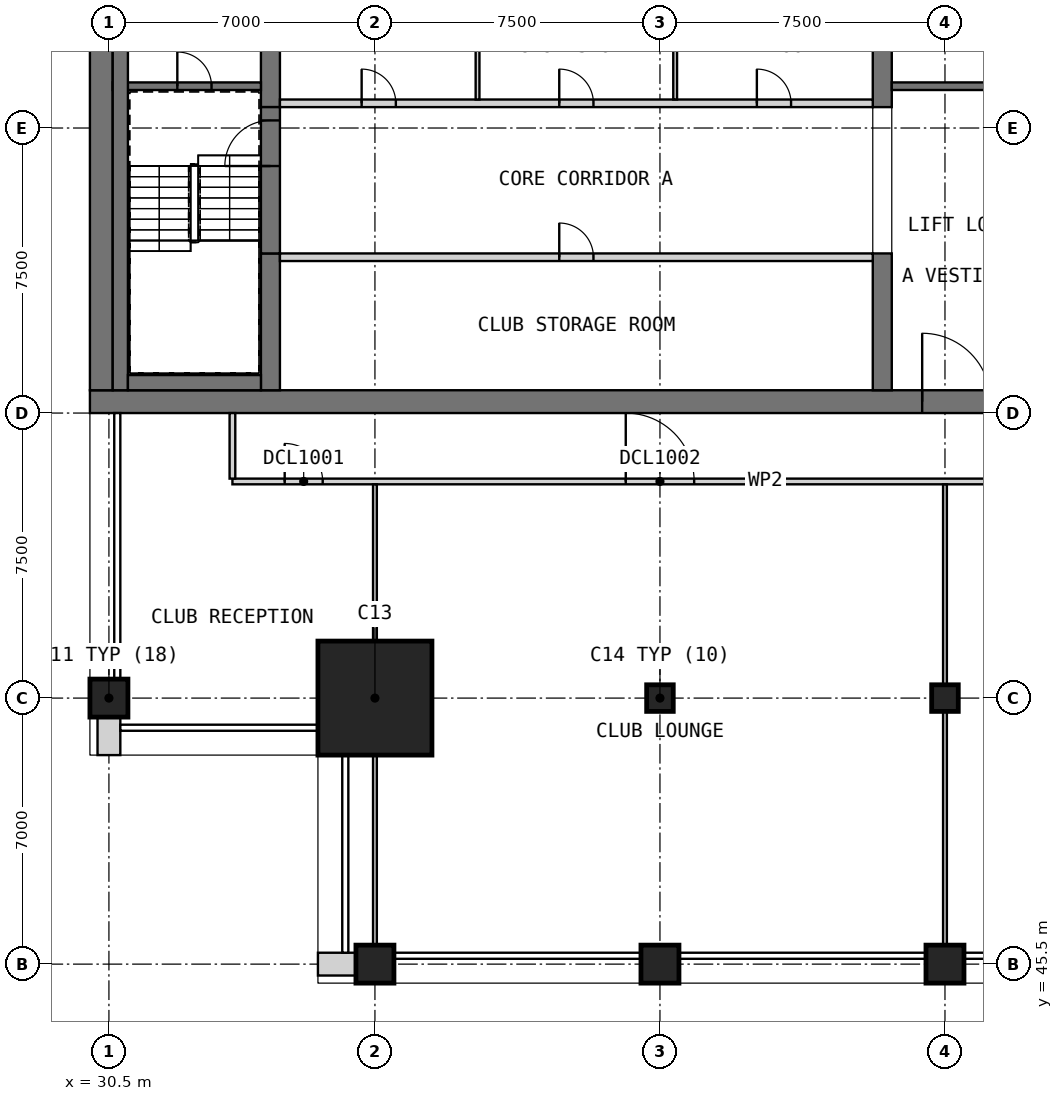
"""IFC4 building model, lengths in metres.
Left out: names, types, materials, properties, quantities, classifications, styles, units other than length and angle.
Written with IfcOpenShell. Run it as: python <this file> out.ifc"""

import sys

from ifc_helpers import new_model, si_unit, direction, frame, frame_2d, origin, origin_2d, place, context, subcontext, project, spatial, rectangle, extrude, element, fill, save


model = new_model("IFC4")
c1 = context("Model", 3, precision=1e-05, world=origin(), true_north=direction((0.0, 1.0)))
c2 = subcontext(c1, "Body", "Model", "MODEL_VIEW")
j1 = project(units=[si_unit("LENGTHUNIT", "METRE"), si_unit("PLANEANGLEUNIT", "RADIAN")], contexts=[c1])
p1 = place(None, origin())
s1 = spatial("IfcSite", under=j1, at=p1, CompositionType="ELEMENT")
p2 = place(p1, origin())
s2 = spatial("IfcBuilding", under=s1, at=p2, CompositionType="ELEMENT")
p3 = place(p2, frame((0.0, 0.0, 287.2)))
s3 = spatial("IfcBuildingStorey", under=s2, at=p3, CompositionType="ELEMENT", Elevation=287.2)
for number, where, z_axis, x_axis in (
    (1, (30.5, 52.5, 0.0), (0.0, 0.0, 1.0), (1.0, 0.0, 0.0)),
    (2, (37.5, 45.5, 0.0), (0.0, 0.0, 1.0), (1.0, 0.0, 0.0)),
    (3, (45.0, 45.5, 0.0), (0.0, 0.0, 1.0), (1.0, 0.0, 0.0)),
):
    element("IfcColumn", number, at=place(p3, frame(where, z_axis=z_axis, x_axis=x_axis)), inside=s3, PredefinedType="COLUMN", context=c2, shape_type="SweptSolid", body=[
        extrude(rectangle(XDim=1.0, YDim=1.0, at=origin_2d()), origin(), (0.0, 0.0, 1.0), 5.0),
    ])
p4 = place(p3, frame((45.0, 52.5, 0.0), z_axis=(0.0, 0.0, 1.0), x_axis=(1.0, 0.0, 0.0)))
e4 = element("IfcColumn", 4, at=p4, inside=s3, PredefinedType="COLUMN", context=c2, shape_type="SweptSolid", body=[
    extrude(rectangle(XDim=0.7, YDim=0.7, at=origin_2d()), origin(), (0.0, 0.0, 1.0), 5.0),
])
p5 = place(p3, frame((52.5, 45.5, 0.0), z_axis=(0.0, 0.0, 1.0), x_axis=(1.0, 0.0, 0.0)))
e5 = element("IfcColumn", 5, at=p5, inside=s3, PredefinedType="COLUMN", context=c2, shape_type="SweptSolid", body=[
    extrude(rectangle(XDim=1.0, YDim=1.0, at=origin_2d()), origin(), (0.0, 0.0, 1.0), 5.0),
])
p6 = place(p3, frame((52.5, 52.5, 0.0), z_axis=(0.0, 0.0, 1.0), x_axis=(1.0, 0.0, 0.0)))
e6 = element("IfcColumn", 6, at=p6, inside=s3, PredefinedType="COLUMN", context=c2, shape_type="SweptSolid", body=[
    extrude(rectangle(XDim=0.7, YDim=0.7, at=origin_2d()), origin(), (0.0, 0.0, 1.0), 5.0),
])
p7 = place(p3, frame((37.5, 52.5, 0.0), z_axis=(0.0, 0.0, 1.0), x_axis=(1.0, 0.0, 0.0)))
e7 = element("IfcColumn", 7, at=p7, inside=s3, PredefinedType="COLUMN", context=c2, shape_type="SweptSolid", body=[
    extrude(rectangle(XDim=3.0, YDim=3.0, at=origin_2d()), origin(), (0.0, 0.0, 1.0), 5.0),
])
p8 = place(p3, frame((30.0, 60.3, 0.0), z_axis=(0.0, 0.0, 1.0), x_axis=(1.0, 0.0, 0.0)))
e8 = element("IfcWall", 8, at=p8, inside=s3, PredefinedType="SHEAR", context=c2, shape_type="SweptSolid", body=[
    extrude(rectangle(XDim=30.0, YDim=0.6, at=frame_2d((15.0, 0.0))), origin(), (0.0, 0.0, 1.0), 5.0),
])
p9 = place(p8, frame((21.9, 0.0, 0.0)))
e9 = element("IfcOpeningElement", 9, at=p9, cuts=e8, PredefinedType="OPENING", context=c2, shape_type="SweptSolid", body=[
    extrude(rectangle(XDim=1.8, YDim=2.1, at=frame_2d((0.9, 1.05))), frame((0.0, 0.31, 0.0), z_axis=(0.0, -1.0, 0.0), x_axis=(1.0, 0.0, 0.0)), (0.0, 0.0, 1.0), 0.62),
])
p10 = place(p8, frame((26.5, 0.0, 0.0)))
e10 = element("IfcOpeningElement", 10, at=p10, cuts=e8, PredefinedType="OPENING", context=c2, shape_type="SweptSolid", body=[
    extrude(rectangle(XDim=1.2, YDim=2.1, at=frame_2d((0.6, 1.05))), frame((0.0, 0.31, 0.0), z_axis=(0.0, -1.0, 0.0), x_axis=(1.0, 0.0, 0.0)), (0.0, 0.0, 1.0), 0.62),
])
p11 = place(p3, frame((30.3, 60.6, 0.0), z_axis=(0.0, 0.0, 1.0), x_axis=(0.0, 1.0, 0.0)))
e11 = element("IfcWall", 11, at=p11, inside=s3, PredefinedType="SHEAR", context=c2, shape_type="SweptSolid", body=[
    extrude(rectangle(XDim=21.3, YDim=0.6, at=frame_2d((10.65, 0.0))), origin(), (0.0, 0.0, 1.0), 5.0),
])
p12 = place(p3, frame((34.75, 60.6, 0.0), z_axis=(0.0, 0.0, 1.0), x_axis=(0.0, 1.0, 0.0)))
e12 = element("IfcWall", 12, at=p12, inside=s3, PredefinedType="SHEAR", context=c2, shape_type="SweptSolid", body=[
    extrude(rectangle(XDim=3.6, YDim=0.5, at=frame_2d((1.8, 0.0))), origin(), (0.0, 0.0, 1.0), 5.0),
])
p13 = place(p3, frame((34.75, 68.05, 0.0), z_axis=(0.0, 0.0, 1.0), x_axis=(0.0, 1.0, 0.0)))
e13 = element("IfcWall", 13, at=p13, inside=s3, PredefinedType="SHEAR", context=c2, shape_type="SweptSolid", body=[
    extrude(rectangle(XDim=6.4, YDim=0.5, at=frame_2d((3.2, 0.0))), origin(), (0.0, 0.0, 1.0), 5.0),
])
p14 = place(p3, frame((50.85, 60.6, 0.0), z_axis=(0.0, 0.0, 1.0), x_axis=(0.0, 1.0, 0.0)))
e14 = element("IfcWall", 14, at=p14, inside=s3, PredefinedType="SHEAR", context=c2, shape_type="SweptSolid", body=[
    extrude(rectangle(XDim=3.6, YDim=0.5, at=frame_2d((1.8, 0.0))), origin(), (0.0, 0.0, 1.0), 5.0),
])
p15 = place(p3, frame((50.85, 68.05, 0.0), z_axis=(0.0, 0.0, 1.0), x_axis=(0.0, 1.0, 0.0)))
e15 = element("IfcWall", 15, at=p15, inside=s3, PredefinedType="SHEAR", context=c2, shape_type="SweptSolid", body=[
    extrude(rectangle(XDim=6.4, YDim=0.5, at=frame_2d((3.2, 0.0))), origin(), (0.0, 0.0, 1.0), 5.0),
])
p16 = place(p2, frame((0.0, 0.0, 34.0)))
s4 = spatial("IfcBuildingStorey", under=s2, at=p16, CompositionType="ELEMENT", Elevation=34.0)
for number, where, z_axis, x_axis in (
    (16, (29.7, 61.05, 0.0), (0.0, 0.0, 1.0), (0.0, 1.0, 0.0)),
    (17, (29.7, 65.925, 0.0), (0.0, 0.0, 1.0), (0.0, 1.0, 0.0)),
):
    element("IfcWall", number, at=place(p16, frame(where, z_axis=z_axis, x_axis=x_axis)), inside=s4, PredefinedType="SOLIDWALL", context=c2, shape_type="SweptSolid", body=[
        extrude(rectangle(XDim=0.9, YDim=0.6, at=frame_2d((0.45, 0.0))), origin(), (0.0, 0.0, 1.0), 286.2),
    ])
for number, where, z_axis, x_axis in (
    (18, (36.0, 45.5, 0.0), (0.0, 0.0, 1.0), (1.0, 0.0, 0.0)),
    (19, (30.5, 52.0, 0.0), (0.0, 0.0, 1.0), (0.0, -1.0, 0.0)),
):
    element("IfcWall", number, at=place(p3, frame(where, z_axis=z_axis, x_axis=x_axis)), inside=s3, PredefinedType="SOLIDWALL", context=c2, shape_type="SweptSolid", body=[
        extrude(rectangle(XDim=1.0, YDim=0.6, at=frame_2d((0.5, 0.0))), origin(), (0.0, 0.0, 1.0), 4.7),
    ])
p17 = place(p3, frame((35.0, 64.1, 0.0), z_axis=(0.0, 0.0, 1.0), x_axis=(1.0, 0.0, 0.0)))
e20 = element("IfcWall", 20, at=p17, inside=s3, PredefinedType="PARTITIONING", context=c2, shape_type="SweptSolid", body=[
    extrude(rectangle(XDim=15.6, YDim=0.2, at=frame_2d((7.8, 0.0))), origin(), (0.0, 0.0, 1.0), 4.7),
])
p18 = place(p17, frame((7.35, 0.0, 0.0)))
e21 = element("IfcOpeningElement", 21, at=p18, cuts=e20, PredefinedType="OPENING", context=c2, shape_type="SweptSolid", body=[
    extrude(rectangle(XDim=0.9, YDim=2.1, at=frame_2d((0.45, 1.05))), frame((0.0, 0.11, 0.0), z_axis=(0.0, -1.0, 0.0), x_axis=(1.0, 0.0, 0.0)), (0.0, 0.0, 1.0), 0.22),
])
p19 = place(p3, frame((35.0, 68.15, 0.0), z_axis=(0.0, 0.0, 1.0), x_axis=(1.0, 0.0, 0.0)))
e22 = element("IfcWall", 22, at=p19, inside=s3, PredefinedType="PARTITIONING", context=c2, shape_type="SweptSolid", body=[
    extrude(rectangle(XDim=15.6, YDim=0.2, at=frame_2d((7.8, 0.0))), origin(), (0.0, 0.0, 1.0), 4.7),
])
p20 = place(p19, frame((2.15, 0.0, 0.0)))
e23 = element("IfcOpeningElement", 23, at=p20, cuts=e22, PredefinedType="OPENING", context=c2, shape_type="SweptSolid", body=[
    extrude(rectangle(XDim=0.9, YDim=2.1, at=frame_2d((0.45, 1.05))), frame((0.0, 0.11, 0.0), z_axis=(0.0, -1.0, 0.0), x_axis=(1.0, 0.0, 0.0)), (0.0, 0.0, 1.0), 0.22),
])
p21 = place(p19, frame((7.35, 0.0, 0.0)))
e24 = element("IfcOpeningElement", 24, at=p21, cuts=e22, PredefinedType="OPENING", context=c2, shape_type="SweptSolid", body=[
    extrude(rectangle(XDim=0.9, YDim=2.1, at=frame_2d((0.45, 1.05))), frame((0.0, 0.11, 0.0), z_axis=(0.0, -1.0, 0.0), x_axis=(1.0, 0.0, 0.0)), (0.0, 0.0, 1.0), 0.22),
])
p22 = place(p19, frame((12.55, 0.0, 0.0)))
e25 = element("IfcOpeningElement", 25, at=p22, cuts=e22, PredefinedType="OPENING", context=c2, shape_type="SweptSolid", body=[
    extrude(rectangle(XDim=0.9, YDim=2.1, at=frame_2d((0.45, 1.05))), frame((0.0, 0.11, 0.0), z_axis=(0.0, -1.0, 0.0), x_axis=(1.0, 0.0, 0.0)), (0.0, 0.0, 1.0), 0.22),
])
for number, where, z_axis, x_axis in (
    (26, (40.2, 68.25, 0.0), (0.0, 0.0, 1.0), (0.0, 1.0, 0.0)),
    (27, (45.4, 68.25, 0.0), (0.0, 0.0, 1.0), (0.0, 1.0, 0.0)),
):
    element("IfcWall", number, at=place(p3, frame(where, z_axis=z_axis, x_axis=x_axis)), inside=s3, PredefinedType="PARTITIONING", context=c2, shape_type="SweptSolid", body=[
        extrude(rectangle(XDim=2.75, YDim=0.1, at=frame_2d((1.375, 0.0))), origin(), (0.0, 0.0, 1.0), 4.7),
    ])
p23 = place(p3, frame((34.75, 64.2, 0.0), z_axis=(0.0, 0.0, 1.0), x_axis=(0.0, 1.0, 0.0)))
e28 = element("IfcWall", 28, at=p23, inside=s3, PredefinedType="SOLIDWALL", context=c2, shape_type="SweptSolid", body=[
    extrude(rectangle(XDim=3.85, YDim=0.5, at=frame_2d((1.925, 0.0))), origin(), (0.0, 0.0, 1.0), 3.8),
])
p24 = place(p23, frame((2.3, 0.0, 0.0)))
e29 = element("IfcOpeningElement", 29, at=p24, cuts=e28, PredefinedType="OPENING", context=c2, shape_type="SweptSolid", body=[
    extrude(rectangle(XDim=1.2, YDim=2.1, at=frame_2d((0.6, 1.05))), frame((0.0, 0.26, 0.0), z_axis=(0.0, -1.0, 0.0), x_axis=(1.0, 0.0, 0.0)), (0.0, 0.0, 1.0), 0.52),
])
p25 = place(p3, frame((30.6, 68.6, 0.0), z_axis=(0.0, 0.0, 1.0), x_axis=(1.0, 0.0, 0.0)))
e30 = element("IfcWall", 30, at=p25, inside=s3, PredefinedType="SOLIDWALL", context=c2, shape_type="SweptSolid", body=[
    extrude(rectangle(XDim=3.9, YDim=0.2, at=frame_2d((1.95, 0.0))), origin(), (0.0, 0.0, 1.0), 4.7),
])
p26 = place(p25, frame((1.7, 0.0, 0.0)))
e31 = element("IfcOpeningElement", 31, at=p26, cuts=e30, PredefinedType="OPENING", context=c2, shape_type="SweptSolid", body=[
    extrude(rectangle(XDim=0.9, YDim=2.1, at=frame_2d((0.45, 1.05))), frame((0.0, 0.11, 0.0), z_axis=(0.0, -1.0, 0.0), x_axis=(1.0, 0.0, 0.0)), (0.0, 0.0, 1.0), 0.22),
])
p27 = place(p3, frame((51.1, 68.6, 0.0), z_axis=(0.0, 0.0, 1.0), x_axis=(1.0, 0.0, 0.0)))
e32 = element("IfcWall", 32, at=p27, inside=s3, PredefinedType="SOLIDWALL", context=c2, shape_type="SweptSolid", body=[
    extrude(rectangle(XDim=8.3, YDim=0.2, at=frame_2d((4.15, 0.0))), origin(), (0.0, 0.0, 1.0), 4.7),
])
p28 = place(p3, frame((30.8, 60.6, 0.0), z_axis=(0.0, 0.0, 1.0), x_axis=(0.0, 1.0, 0.0)))
e33 = element("IfcWall", 33, at=p28, inside=s3, PredefinedType="SOLIDWALL", context=c2, shape_type="SweptSolid", body=[
    extrude(rectangle(XDim=21.3, YDim=0.4, at=frame_2d((10.65, 0.0))), origin(), (0.0, 0.0, 1.0), 4.7),
])
p29 = place(p3, frame((31.0, 60.8, 0.0), z_axis=(0.0, 0.0, 1.0), x_axis=(1.0, 0.0, 0.0)))
e34 = element("IfcWall", 34, at=p29, inside=s3, PredefinedType="SOLIDWALL", context=c2, shape_type="SweptSolid", body=[
    extrude(rectangle(XDim=3.5, YDim=0.4, at=frame_2d((1.75, 0.0))), origin(), (0.0, 0.0, 1.0), 4.7),
])
p30 = place(p3, frame((33.75, 58.2, 0.0), z_axis=(0.0, 0.0, 1.0), x_axis=(1.0, 0.0, 0.0)))
e35 = element("IfcWall", 35, at=p30, inside=s3, PredefinedType="PARTITIONING", context=c2, shape_type="SweptSolid", body=[
    extrude(rectangle(XDim=28.05, YDim=0.15, at=frame_2d((14.025, 0.0))), origin(), (0.0, 0.0, 1.0), 4.7),
])
p31 = place(p30, frame((1.375, 0.0, 0.0)))
e36 = element("IfcOpeningElement", 36, at=p31, cuts=e35, PredefinedType="OPENING", context=c2, shape_type="SweptSolid", body=[
    extrude(rectangle(XDim=1.0, YDim=2.1, at=frame_2d((0.5, 1.05))), frame((0.0, 0.085, 0.0), z_axis=(0.0, -1.0, 0.0), x_axis=(1.0, 0.0, 0.0)), (0.0, 0.0, 1.0), 0.17),
])
p32 = place(p30, frame((10.35, 0.0, 0.0)))
e37 = element("IfcOpeningElement", 37, at=p32, cuts=e35, PredefinedType="OPENING", context=c2, shape_type="SweptSolid", body=[
    extrude(rectangle(XDim=1.8, YDim=2.1, at=frame_2d((0.9, 1.05))), frame((0.0, 0.085, 0.0), z_axis=(0.0, -1.0, 0.0), x_axis=(1.0, 0.0, 0.0)), (0.0, 0.0, 1.0), 0.17),
])
p33 = place(p30, frame((22.0, 0.0, 0.0)))
e38 = element("IfcOpeningElement", 38, at=p33, cuts=e35, PredefinedType="OPENING", context=c2, shape_type="SweptSolid", body=[
    extrude(rectangle(XDim=1.0, YDim=2.1, at=frame_2d((0.5, 1.05))), frame((0.0, 0.085, 0.0), z_axis=(0.0, -1.0, 0.0), x_axis=(1.0, 0.0, 0.0)), (0.0, 0.0, 1.0), 0.17),
])
p34 = place(p30, frame((26.65, 0.0, 0.0)))
e39 = element("IfcOpeningElement", 39, at=p34, cuts=e35, PredefinedType="OPENING", context=c2, shape_type="SweptSolid", body=[
    extrude(rectangle(XDim=1.0, YDim=2.1, at=frame_2d((0.5, 1.05))), frame((0.0, 0.085, 0.0), z_axis=(0.0, -1.0, 0.0), x_axis=(1.0, 0.0, 0.0)), (0.0, 0.0, 1.0), 0.17),
])
p35 = place(p3, frame((33.75, 58.275, 0.0), z_axis=(0.0, 0.0, 1.0), x_axis=(0.0, 1.0, 0.0)))
e40 = element("IfcWall", 40, at=p35, inside=s3, PredefinedType="PARTITIONING", context=c2, shape_type="SweptSolid", body=[
    extrude(rectangle(XDim=1.725, YDim=0.15, at=frame_2d((0.863, 0.0))), origin(), (0.0, 0.0, 1.0), 4.7),
])
p36 = place(p3, frame((37.5, 45.0, 0.0), z_axis=(0.0, 0.0, 1.0), x_axis=(0.0, 1.0, 0.0)))
e41 = element("IfcWall", 41, at=p36, inside=s3, PredefinedType="PARTITIONING", context=c2, shape_type="SweptSolid", body=[
    extrude(rectangle(XDim=13.125, YDim=0.1, at=frame_2d((6.562, 0.0))), origin(), (0.0, 0.0, 1.0), 4.25),
])
p37 = place(p3, frame((52.5, 45.0, 0.0), z_axis=(0.0, 0.0, 1.0), x_axis=(0.0, 1.0, 0.0)))
e42 = element("IfcWall", 42, at=p37, inside=s3, PredefinedType="PARTITIONING", context=c2, shape_type="SweptSolid", body=[
    extrude(rectangle(XDim=13.125, YDim=0.1, at=frame_2d((6.562, 0.0))), origin(), (0.0, 0.0, 1.0), 4.7),
])
p38 = place(p18, origin())
e43 = element("IfcDoor", 43, at=p38, inside=s3, OperationType="SINGLE_SWING_RIGHT", PredefinedType="DOOR", context=c2, shape_type="SweptSolid", body=[
    extrude(rectangle(XDim=0.9, YDim=2.1, at=frame_2d((0.45, 1.05))), frame((0.0, 0.025, 0.0), z_axis=(0.0, -1.0, 0.0), x_axis=(1.0, 0.0, 0.0)), (0.0, 0.0, 1.0), 0.05),
])
fill(e21, e43)
p39 = place(p20, origin())
e44 = element("IfcDoor", 44, at=p39, inside=s3, OperationType="SINGLE_SWING_RIGHT", PredefinedType="DOOR", context=c2, shape_type="SweptSolid", body=[
    extrude(rectangle(XDim=0.9, YDim=2.1, at=frame_2d((0.45, 1.05))), frame((0.0, 0.025, 0.0), z_axis=(0.0, -1.0, 0.0), x_axis=(1.0, 0.0, 0.0)), (0.0, 0.0, 1.0), 0.05),
])
fill(e23, e44)
p40 = place(p21, origin())
e45 = element("IfcDoor", 45, at=p40, inside=s3, OperationType="SINGLE_SWING_LEFT", PredefinedType="DOOR", context=c2, shape_type="SweptSolid", body=[
    extrude(rectangle(XDim=0.9, YDim=2.1, at=frame_2d((0.45, 1.05))), frame((0.0, 0.025, 0.0), z_axis=(0.0, -1.0, 0.0), x_axis=(1.0, 0.0, 0.0)), (0.0, 0.0, 1.0), 0.05),
])
fill(e24, e45)
p41 = place(p22, origin())
e46 = element("IfcDoor", 46, at=p41, inside=s3, OperationType="SINGLE_SWING_RIGHT", PredefinedType="DOOR", context=c2, shape_type="SweptSolid", body=[
    extrude(rectangle(XDim=0.9, YDim=2.1, at=frame_2d((0.45, 1.05))), frame((0.0, 0.025, 0.0), z_axis=(0.0, -1.0, 0.0), x_axis=(1.0, 0.0, 0.0)), (0.0, 0.0, 1.0), 0.05),
])
fill(e25, e46)
p42 = place(p9, origin())
e47 = element("IfcDoor", 47, at=p42, inside=s3, OperationType="DOUBLE_DOOR_SINGLE_SWING", PredefinedType="DOOR", context=c2, shape_type="SweptSolid", body=[
    extrude(rectangle(XDim=1.8, YDim=2.1, at=frame_2d((0.9, 1.05))), frame((0.0, 0.025, 0.0), z_axis=(0.0, -1.0, 0.0), x_axis=(1.0, 0.0, 0.0)), (0.0, 0.0, 1.0), 0.05),
])
fill(e9, e47)
p43 = place(p24, origin())
e48 = element("IfcDoor", 48, at=p43, inside=s3, OperationType="SINGLE_SWING_LEFT", PredefinedType="DOOR", context=c2, shape_type="SweptSolid", body=[
    extrude(rectangle(XDim=1.2, YDim=2.1, at=frame_2d((0.6, 1.05))), frame((0.0, 0.025, 0.0), z_axis=(0.0, -1.0, 0.0), x_axis=(1.0, 0.0, 0.0)), (0.0, 0.0, 1.0), 0.05),
])
fill(e29, e48)
p44 = place(p26, origin())
e49 = element("IfcDoor", 49, at=p44, inside=s3, OperationType="SINGLE_SWING_LEFT", PredefinedType="DOOR", context=c2, shape_type="SweptSolid", body=[
    extrude(rectangle(XDim=0.9, YDim=2.1, at=frame_2d((0.45, 1.05))), frame((0.0, 0.025, 0.0), z_axis=(0.0, -1.0, 0.0), x_axis=(1.0, 0.0, 0.0)), (0.0, 0.0, 1.0), 0.05),
])
fill(e31, e49)
p45 = place(p31, origin())
e50 = element("IfcDoor", 50, at=p45, inside=s3, OperationType="SINGLE_SWING_RIGHT", PredefinedType="DOOR", context=c2, shape_type="SweptSolid", body=[
    extrude(rectangle(XDim=1.0, YDim=2.1, at=frame_2d((0.5, 1.05))), frame((0.0, 0.025, 0.0), z_axis=(0.0, -1.0, 0.0), x_axis=(1.0, 0.0, 0.0)), (0.0, 0.0, 1.0), 0.05),
])
fill(e36, e50)
p46 = place(p32, origin())
e51 = element("IfcDoor", 51, at=p46, inside=s3, OperationType="DOUBLE_DOOR_SINGLE_SWING", PredefinedType="DOOR", context=c2, shape_type="SweptSolid", body=[
    extrude(rectangle(XDim=1.8, YDim=2.1, at=frame_2d((0.9, 1.05))), frame((0.0, 0.025, 0.0), z_axis=(0.0, -1.0, 0.0), x_axis=(1.0, 0.0, 0.0)), (0.0, 0.0, 1.0), 0.05),
])
fill(e37, e51)
save(model, sys.argv[1])
